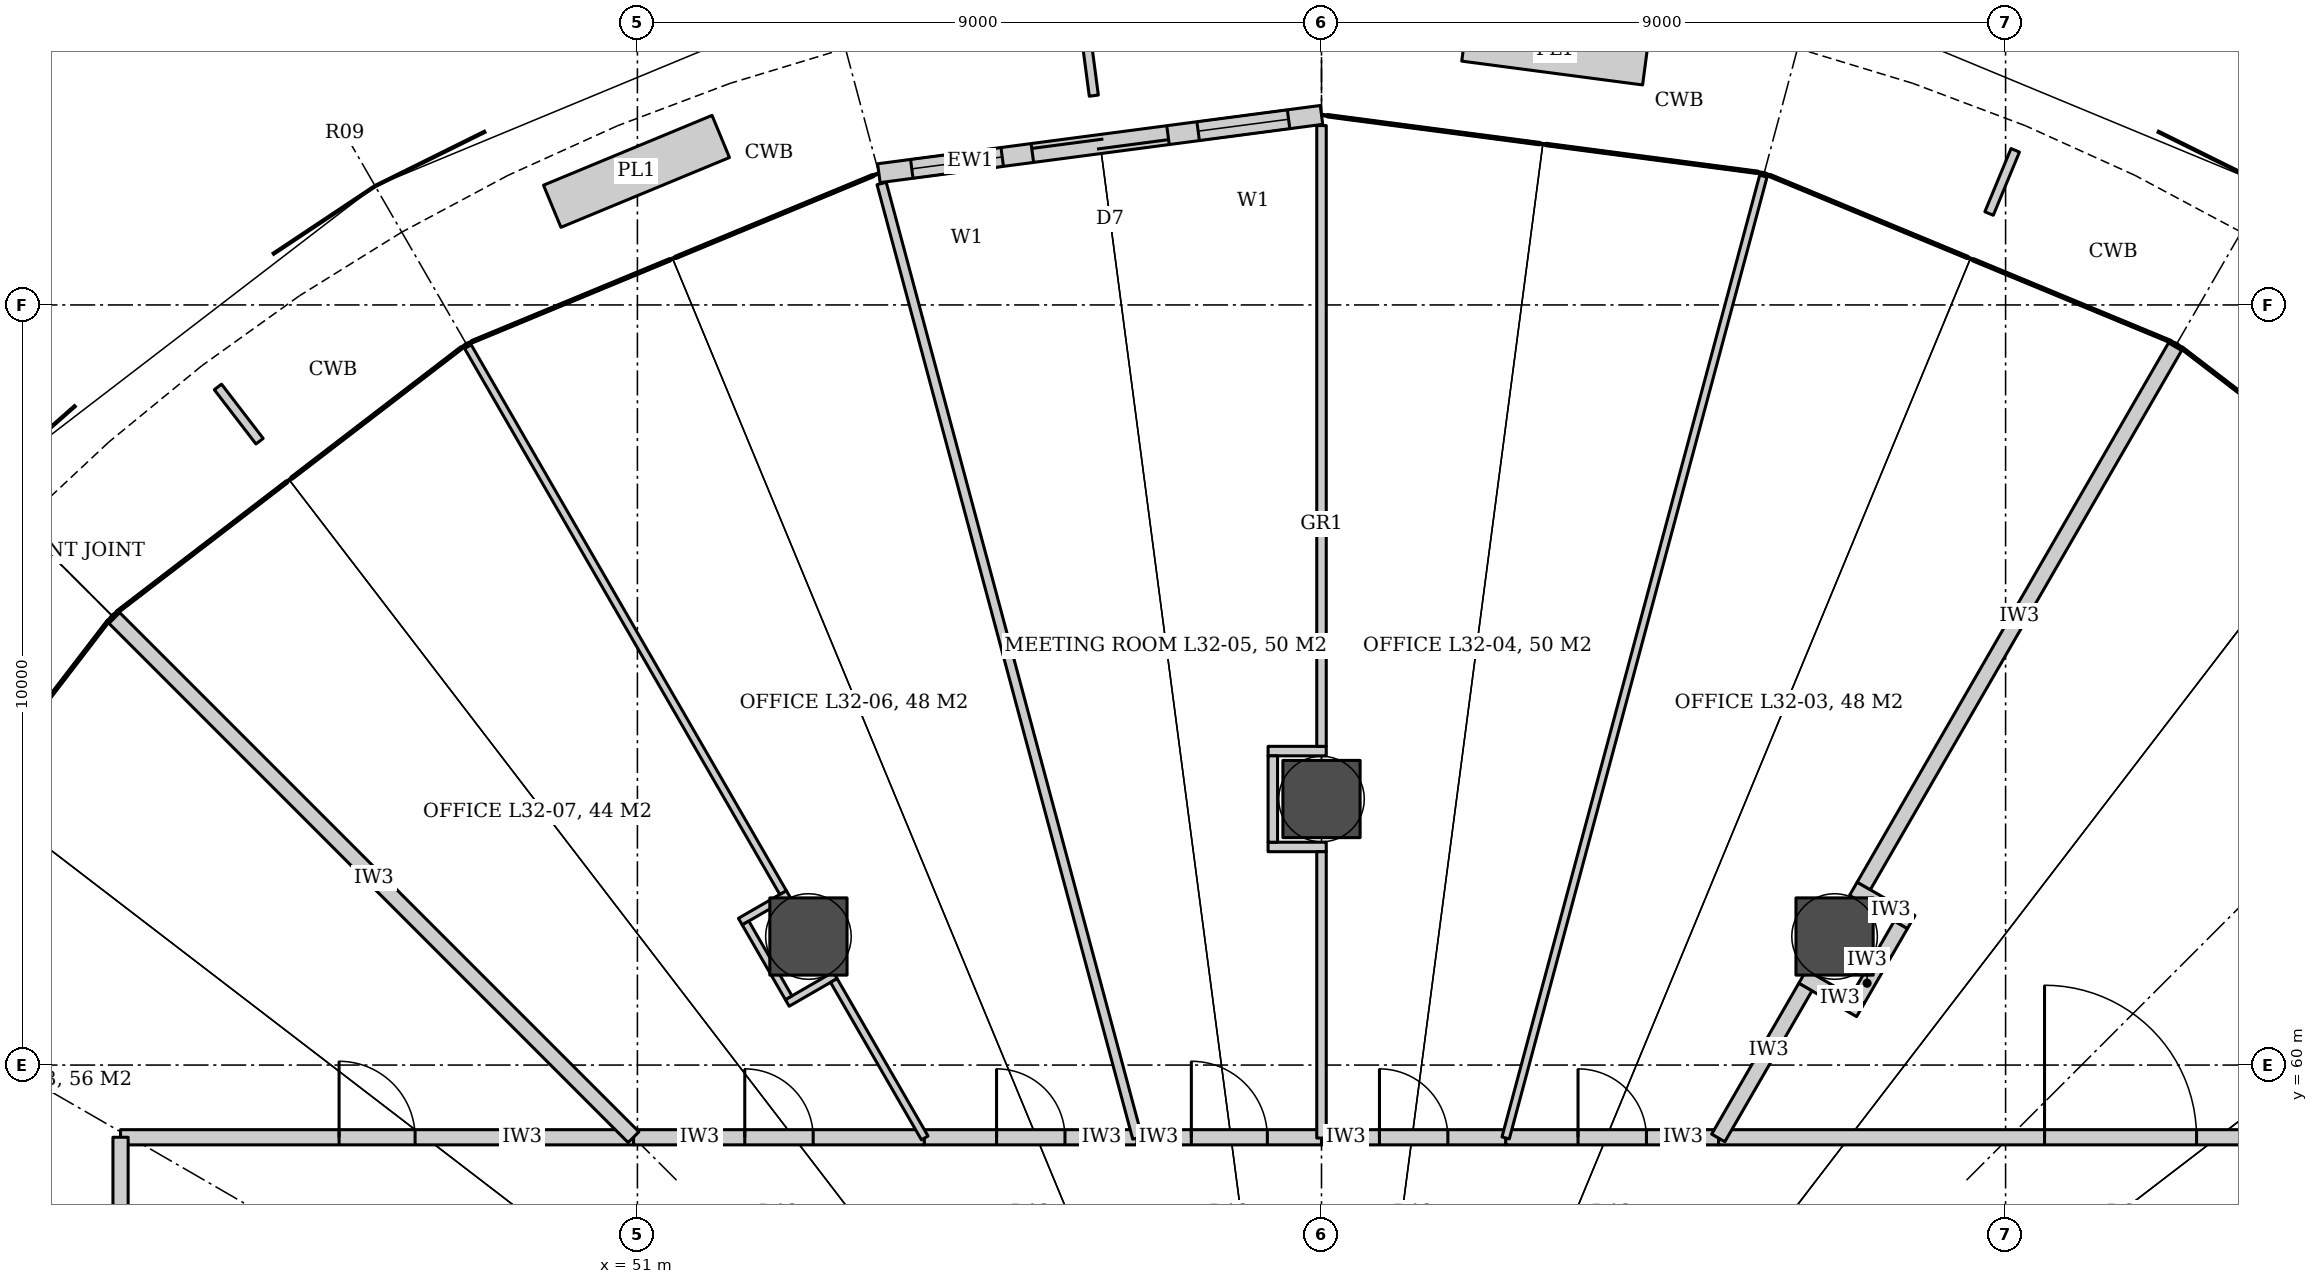
"""IFC4 building model, lengths in metres.
Left out: names, types, materials, properties, quantities, classifications, styles, units other than length and angle.
Written with IfcOpenShell. Run it as: python <this file> out.ifc"""

import sys

from ifc_helpers import new_model, si_unit, direction, frame, frame_2d, origin, origin_2d, place, context, subcontext, project, spatial, rectangle, hollow_circle, extrude, element, fill, save


model = new_model("IFC4")
c1 = context("Model", 3, precision=1e-05, world=origin(), true_north=direction((0.0, 1.0)))
c2 = subcontext(c1, "Body", "Model", "MODEL_VIEW")
j1 = project(units=[si_unit("LENGTHUNIT", "METRE"), si_unit("PLANEANGLEUNIT", "RADIAN")], contexts=[c1])
p1 = place(None, origin())
s1 = spatial("IfcSite", under=j1, at=p1, CompositionType="ELEMENT")
p2 = place(p1, origin())
s2 = spatial("IfcBuilding", under=s1, at=p2, CompositionType="ELEMENT")
p3 = place(p2, frame((0.0, 0.0, 135.2)))
s3 = spatial("IfcBuildingStorey", under=s2, at=p3, CompositionType="ELEMENT", Elevation=135.2)
for number, where, z_axis, x_axis in (
    (1, (66.75, 61.691, 0.0), (0.0, 0.0, 1.0), (1.0, 0.0, 0.0)),
    (2, (60.0, 63.5, 0.0), (0.0, 0.0, 1.0), (1.0, 0.0, 0.0)),
    (3, (53.25, 61.691, 0.0), (0.0, 0.0, 1.0), (1.0, 0.0, 0.0)),
):
    element("IfcColumn", number, at=place(p3, frame(where, z_axis=z_axis, x_axis=x_axis)), inside=s3, PredefinedType="COLUMN", context=c2, shape_type="SweptSolid", body=[
        extrude(hollow_circle(Radius=0.508, WallThickness=0.05, at=origin_2d()), origin(), (0.0, 0.0, 1.0), 4.2),
    ])
p4 = place(p3, frame((44.2, 59.05, 0.0), z_axis=(0.0, 0.0, 1.0), x_axis=(1.0, 0.0, 0.0)))
e4 = element("IfcWall", 4, at=p4, inside=s3, PredefinedType="PARTITIONING", context=c2, shape_type="SweptSolid", body=[
    extrude(rectangle(XDim=6.75, YDim=0.2, at=frame_2d((3.375, 0.0))), origin(), (0.0, 0.0, 1.0), 3.02),
])
p5 = place(p4, frame((2.875, 0.0, 0.0)))
e5 = element("IfcOpeningElement", 5, at=p5, cuts=e4, PredefinedType="OPENING", context=c2, shape_type="SweptSolid", body=[
    extrude(rectangle(XDim=1.0, YDim=2.1, at=frame_2d((0.5, 1.05))), frame((0.0, 0.11, 0.0), z_axis=(0.0, -1.0, 0.0), x_axis=(1.0, 0.0, 0.0)), (0.0, 0.0, 1.0), 0.22),
])
p6 = place(p3, frame((50.95, 59.05, 0.0), z_axis=(0.0, 0.0, 1.0), x_axis=(1.0, 0.0, 0.0)))
e6 = element("IfcWall", 6, at=p6, inside=s3, PredefinedType="PARTITIONING", context=c2, shape_type="SweptSolid", body=[
    extrude(rectangle(XDim=3.825, YDim=0.2, at=frame_2d((1.913, 0.0))), origin(), (0.0, 0.0, 1.0), 3.02),
])
p7 = place(p6, frame((1.462, 0.0, 0.0)))
e7 = element("IfcOpeningElement", 7, at=p7, cuts=e6, PredefinedType="OPENING", context=c2, shape_type="SweptSolid", body=[
    extrude(rectangle(XDim=0.9, YDim=2.4, at=frame_2d((0.45, 1.2))), frame((0.0, 0.11, 0.0), z_axis=(0.0, -1.0, 0.0), x_axis=(1.0, 0.0, 0.0)), (0.0, 0.0, 1.0), 0.22),
])
p8 = place(p3, frame((54.775, 59.05, 0.0), z_axis=(0.0, 0.0, 1.0), x_axis=(1.0, 0.0, 0.0)))
e8 = element("IfcWall", 8, at=p8, inside=s3, PredefinedType="PARTITIONING", context=c2, shape_type="SweptSolid", body=[
    extrude(rectangle(XDim=2.8, YDim=0.2, at=frame_2d((1.4, 0.0))), origin(), (0.0, 0.0, 1.0), 3.04),
])
p9 = place(p8, frame((0.95, 0.0, 0.0)))
e9 = element("IfcOpeningElement", 9, at=p9, cuts=e8, PredefinedType="OPENING", context=c2, shape_type="SweptSolid", body=[
    extrude(rectangle(XDim=0.9, YDim=2.4, at=frame_2d((0.45, 1.2))), frame((0.0, 0.11, 0.0), z_axis=(0.0, -1.0, 0.0), x_axis=(1.0, 0.0, 0.0)), (0.0, 0.0, 1.0), 0.22),
])
p10 = place(p3, frame((57.575, 59.05, 0.0), z_axis=(0.0, 0.0, 1.0), x_axis=(1.0, 0.0, 0.0)))
e10 = element("IfcWall", 10, at=p10, inside=s3, PredefinedType="PARTITIONING", context=c2, shape_type="SweptSolid", body=[
    extrude(rectangle(XDim=2.425, YDim=0.2, at=frame_2d((1.212, 0.0))), origin(), (0.0, 0.0, 1.0), 3.04),
])
p11 = place(p10, frame((0.712, 0.0, 0.0)))
e11 = element("IfcOpeningElement", 11, at=p11, cuts=e10, PredefinedType="OPENING", context=c2, shape_type="SweptSolid", body=[
    extrude(rectangle(XDim=1.0, YDim=2.4, at=frame_2d((0.5, 1.2))), frame((0.0, 0.11, 0.0), z_axis=(0.0, -1.0, 0.0), x_axis=(1.0, 0.0, 0.0)), (0.0, 0.0, 1.0), 0.22),
])
p12 = place(p3, frame((60.0, 59.05, 0.0), z_axis=(0.0, 0.0, 1.0), x_axis=(1.0, 0.0, 0.0)))
e12 = element("IfcWall", 12, at=p12, inside=s3, PredefinedType="PARTITIONING", context=c2, shape_type="SweptSolid", body=[
    extrude(rectangle(XDim=2.425, YDim=0.2, at=frame_2d((1.212, 0.0))), origin(), (0.0, 0.0, 1.0), 3.04),
])
p13 = place(p12, frame((0.762, 0.0, 0.0)))
e13 = element("IfcOpeningElement", 13, at=p13, cuts=e12, PredefinedType="OPENING", context=c2, shape_type="SweptSolid", body=[
    extrude(rectangle(XDim=0.9, YDim=2.4, at=frame_2d((0.45, 1.2))), frame((0.0, 0.11, 0.0), z_axis=(0.0, -1.0, 0.0), x_axis=(1.0, 0.0, 0.0)), (0.0, 0.0, 1.0), 0.22),
])
p14 = place(p3, frame((62.425, 59.05, 0.0), z_axis=(0.0, 0.0, 1.0), x_axis=(1.0, 0.0, 0.0)))
e14 = element("IfcWall", 14, at=p14, inside=s3, PredefinedType="PARTITIONING", context=c2, shape_type="SweptSolid", body=[
    extrude(rectangle(XDim=2.8, YDim=0.2, at=frame_2d((1.4, 0.0))), origin(), (0.0, 0.0, 1.0), 3.04),
])
p15 = place(p14, frame((0.95, 0.0, 0.0)))
e15 = element("IfcOpeningElement", 15, at=p15, cuts=e14, PredefinedType="OPENING", context=c2, shape_type="SweptSolid", body=[
    extrude(rectangle(XDim=0.9, YDim=2.4, at=frame_2d((0.45, 1.2))), frame((0.0, 0.11, 0.0), z_axis=(0.0, -1.0, 0.0), x_axis=(1.0, 0.0, 0.0)), (0.0, 0.0, 1.0), 0.22),
])
p16 = place(p3, frame((65.225, 59.05, 0.0), z_axis=(0.0, 0.0, 1.0), x_axis=(1.0, 0.0, 0.0)))
e16 = element("IfcWall", 16, at=p16, inside=s3, PredefinedType="PARTITIONING", context=c2, shape_type="SweptSolid", body=[
    extrude(rectangle(XDim=10.575, YDim=0.2, at=frame_2d((5.288, 0.0))), origin(), (0.0, 0.0, 1.0), 3.02),
])
p17 = place(p16, frame((4.288, 0.0, 0.0)))
e17 = element("IfcOpeningElement", 17, at=p17, cuts=e16, PredefinedType="OPENING", context=c2, shape_type="SweptSolid", body=[
    extrude(rectangle(XDim=2.0, YDim=2.1, at=frame_2d((1.0, 1.05))), frame((0.0, 0.11, 0.0), z_axis=(0.0, -1.0, 0.0), x_axis=(1.0, 0.0, 0.0)), (0.0, 0.0, 1.0), 0.22),
])
p18 = place(p3, frame((44.2, 54.234, 0.0), z_axis=(0.0, 0.0, 1.0), x_axis=(0.0, 1.0, 0.0)))
e18 = element("IfcWall", 18, at=p18, inside=s3, PredefinedType="PARTITIONING", context=c2, shape_type="SweptSolid", body=[
    extrude(rectangle(XDim=4.816, YDim=0.2, at=frame_2d((2.408, 0.0))), origin(), (0.0, 0.0, 1.0), 3.04),
])
for number, where, z_axis, x_axis in (
    (19, (66.329, 61.163, 0.0), (0.0, 0.0, 1.0), (0.866, -0.5, 0.0)),
    (20, (66.997, 62.32, 0.0), (0.0, 0.0, 1.0), (0.866, -0.5, 0.0)),
):
    element("IfcWall", number, at=place(p3, frame(where, z_axis=z_axis, x_axis=x_axis)), inside=s3, PredefinedType="PARTITIONING", context=c2, shape_type="SweptSolid", body=[
        extrude(rectangle(XDim=0.878, YDim=0.2, at=frame_2d((0.439, 0.0))), origin(), (0.0, 0.0, 1.0), 3.02),
    ])
p19 = place(p3, frame((67.053, 60.86, 0.0), z_axis=(0.0, 0.0, 1.0), x_axis=(0.499883687939, 0.866092546171, 0.0)))
e21 = element("IfcWall", 21, at=p19, inside=s3, PredefinedType="PARTITIONING", context=c2, shape_type="SweptSolid", body=[
    extrude(rectangle(XDim=1.136, YDim=0.2, at=frame_2d((0.568, 0.0))), origin(), (0.0, 0.0, 1.0), 3.02),
])
p20 = place(p3, frame((65.22, 59.041, 0.0), z_axis=(0.0, 0.0, 1.0), x_axis=(0.500011369369, 0.866018839577, 0.0)))
e22 = element("IfcWall", 22, at=p20, inside=s3, PredefinedType="PARTITIONING", context=c2, shape_type="SweptSolid", body=[
    extrude(rectangle(XDim=2.292, YDim=0.2, at=frame_2d((1.146, 0.0))), origin(), (0.0, 0.0, 1.0), 3.04),
])
p21 = place(p3, frame((67.134, 62.356, 0.0), z_axis=(0.0, 0.0, 1.0), x_axis=(0.499996007168, 0.866027709035, 0.0)))
e23 = element("IfcWall", 23, at=p21, inside=s3, PredefinedType="PARTITIONING", context=c2, shape_type="SweptSolid", body=[
    extrude(rectangle(XDim=8.292, YDim=0.2, at=frame_2d((4.146, 0.0))), origin(), (0.0, 0.0, 1.0), 3.04),
])
p22 = place(p3, frame((62.423, 59.041, 0.0), z_axis=(0.0, 0.0, 1.0), x_axis=(0.258825143973, 0.965924192081, 0.0)))
e24 = element("IfcWall", 24, at=p22, inside=s3, PredefinedType="PARTITIONING", context=c2, shape_type="SweptSolid", body=[
    extrude(rectangle(XDim=13.2, YDim=0.1, at=frame_2d((6.6, 0.0))), origin(), (0.0, 0.0, 1.0), 3.02),
])
for number, where, z_axis, x_axis in (
    (25, (60.062, 62.869, 0.0), (0.0, 0.0, 1.0), (-1.0, 0.0, 0.0)),
    (26, (60.062, 64.131, 0.0), (0.0, 0.0, 1.0), (-1.0, 0.0, 0.0)),
):
    element("IfcWall", number, at=place(p3, frame(where, z_axis=z_axis, x_axis=x_axis)), inside=s3, PredefinedType="PARTITIONING", context=c2, shape_type="SweptSolid", body=[
        extrude(rectangle(XDim=0.765, YDim=0.125, at=frame_2d((0.383, 0.0))), origin(), (0.0, 0.0, 1.0), 3.02),
    ])
p23 = place(p3, frame((59.36, 62.932, 0.0), z_axis=(0.0, 0.0, 1.0), x_axis=(0.0, 1.0, 0.0)))
e27 = element("IfcWall", 27, at=p23, inside=s3, PredefinedType="PARTITIONING", context=c2, shape_type="SweptSolid", body=[
    extrude(rectangle(XDim=1.136, YDim=0.125, at=frame_2d((0.568, 0.0))), origin(), (0.0, 0.0, 1.0), 3.02),
])
p24 = place(p3, frame((60.0, 59.04, 0.0), z_axis=(0.0, 0.0, 1.0), x_axis=(0.0, 1.0, 0.0)))
e28 = element("IfcWall", 28, at=p24, inside=s3, PredefinedType="PARTITIONING", context=c2, shape_type="SweptSolid", body=[
    extrude(rectangle(XDim=3.767, YDim=0.125, at=frame_2d((1.883, 0.0))), origin(), (0.0, 0.0, 1.0), 3.04),
])
p25 = place(p3, frame((60.0, 64.193, 0.0), z_axis=(0.0, 0.0, 1.0), x_axis=(0.0, 1.0, 0.0)))
e29 = element("IfcWall", 29, at=p25, inside=s3, PredefinedType="PARTITIONING", context=c2, shape_type="SweptSolid", body=[
    extrude(rectangle(XDim=8.267, YDim=0.125, at=frame_2d((4.133, 0.0))), origin(), (0.0, 0.0, 1.0), 3.04),
])
p26 = place(p3, frame((57.577, 59.041, 0.0), z_axis=(0.0, 0.0, 1.0), x_axis=(-0.258809678054, 0.965928336133, 0.0)))
e30 = element("IfcWall", 30, at=p26, inside=s3, PredefinedType="PARTITIONING", context=c2, shape_type="SweptSolid", body=[
    extrude(rectangle(XDim=13.1, YDim=0.125, at=frame_2d((6.55, 0.0))), origin(), (0.0, 0.0, 1.0), 3.02),
])
for number, where, z_axis, x_axis in (
    (31, (53.602, 61.181, 0.0), (0.0, 0.0, 1.0), (-0.866, -0.5, 0.0)),
    (32, (52.984, 62.251, 0.0), (0.0, 0.0, 1.0), (-0.866, -0.5, 0.0)),
):
    element("IfcWall", number, at=place(p3, frame(where, z_axis=z_axis, x_axis=x_axis)), inside=s3, PredefinedType="PARTITIONING", context=c2, shape_type="SweptSolid", body=[
        extrude(rectangle(XDim=0.728, YDim=0.1, at=frame_2d((0.364, 0.0))), origin(), (0.0, 0.0, 1.0), 3.02),
    ])
p27 = place(p3, frame((52.99, 60.885, 0.0), z_axis=(0.0, 0.0, 1.0), x_axis=(-0.499976747263, 0.866038828342, 0.0)))
e33 = element("IfcWall", 33, at=p27, inside=s3, PredefinedType="PARTITIONING", context=c2, shape_type="SweptSolid", body=[
    extrude(rectangle(XDim=1.136, YDim=0.1, at=frame_2d((0.568, 0.0))), origin(), (0.0, 0.0, 1.0), 3.02),
])
p28 = place(p3, frame((54.78, 59.041, 0.0), z_axis=(0.0, 0.0, 1.0), x_axis=(-0.500014005679, 0.866017317451, 0.0)))
e34 = element("IfcWall", 34, at=p28, inside=s3, PredefinedType="PARTITIONING", context=c2, shape_type="SweptSolid", body=[
    extrude(rectangle(XDim=2.392, YDim=0.1, at=frame_2d((1.196, 0.0))), origin(), (0.0, 0.0, 1.0), 3.04),
])
p29 = place(p3, frame((52.916, 62.27, 0.0), z_axis=(0.0, 0.0, 1.0), x_axis=(-0.499996941814, 0.866027169422, 0.0)))
e35 = element("IfcWall", 35, at=p29, inside=s3, PredefinedType="PARTITIONING", context=c2, shape_type="SweptSolid", body=[
    extrude(rectangle(XDim=8.392, YDim=0.1, at=frame_2d((4.196, 0.0))), origin(), (0.0, 0.0, 1.0), 3.04),
])
p30 = place(p3, frame((50.949, 59.051, 0.0), z_axis=(0.0, 0.0, 1.0), x_axis=(-0.707106781187, 0.707106781187, 0.0)))
e36 = element("IfcWall", 36, at=p30, inside=s3, PredefinedType="PARTITIONING", context=c2, shape_type="SweptSolid", body=[
    extrude(rectangle(XDim=9.76, YDim=0.2, at=frame_2d((4.88, 0.0))), origin(), (0.0, 0.0, 1.0), 3.02),
])
p31 = place(p3, frame((60.0, 72.6, 0.0), z_axis=(0.0, 0.0, 1.0), x_axis=(-0.991440909901, -0.130556203128, 0.0)))
e37 = element("IfcWall", 37, at=p31, inside=s3, PredefinedType="SOLIDWALL", context=c2, shape_type="SweptSolid", body=[
    extrude(rectangle(XDim=5.9, YDim=0.25, at=frame_2d((2.95, 0.0))), origin(), (0.0, 0.0, 1.0), 4.04),
])
p32 = place(p31, frame((2.05, 0.0, 0.0)))
e38 = element("IfcOpeningElement", 38, at=p32, cuts=e37, PredefinedType="OPENING", context=c2, shape_type="SweptSolid", body=[
    extrude(rectangle(XDim=1.8, YDim=2.4, at=frame_2d((0.9, 1.2))), frame((0.0, 0.135, 0.0), z_axis=(0.0, -1.0, 0.0), x_axis=(1.0, 0.0, 0.0)), (0.0, 0.0, 1.0), 0.27),
])
p33 = place(p31, frame((0.45, 0.0, 0.0)))
e39 = element("IfcOpeningElement", 39, at=p33, cuts=e37, PredefinedType="OPENING", context=c2, shape_type="SweptSolid", body=[
    extrude(rectangle(XDim=1.2, YDim=2.4, at=frame_2d((0.6, 1.2))), frame((0.0, 0.135, 0.0), z_axis=(0.0, -1.0, 0.0), x_axis=(1.0, 0.0, 0.0)), (0.0, 0.0, 1.0), 0.27),
])
p34 = place(p31, frame((4.25, 0.0, 0.0)))
e40 = element("IfcOpeningElement", 40, at=p34, cuts=e37, PredefinedType="OPENING", context=c2, shape_type="SweptSolid", body=[
    extrude(rectangle(XDim=1.2, YDim=2.4, at=frame_2d((0.6, 1.2))), frame((0.0, 0.135, 0.0), z_axis=(0.0, -1.0, 0.0), x_axis=(1.0, 0.0, 0.0)), (0.0, 0.0, 1.0), 0.27),
])
p35 = place(p17, origin())
e41 = element("IfcDoor", 41, at=p35, inside=s3, OperationType="DOUBLE_DOOR_DOUBLE_SWING", PredefinedType="DOOR", context=c2, shape_type="SweptSolid", body=[
    extrude(rectangle(XDim=2.0, YDim=2.1, at=frame_2d((1.0, 1.05))), frame((0.0, 0.025, 0.0), z_axis=(0.0, -1.0, 0.0), x_axis=(1.0, 0.0, 0.0)), (0.0, 0.0, 1.0), 0.05),
])
fill(e17, e41)
p36 = place(p15, origin())
e42 = element("IfcDoor", 42, at=p36, inside=s3, OperationType="SINGLE_SWING_LEFT", PredefinedType="DOOR", context=c2, shape_type="SweptSolid", body=[
    extrude(rectangle(XDim=0.9, YDim=2.4, at=frame_2d((0.45, 1.2))), frame((0.0, 0.025, 0.0), z_axis=(0.0, -1.0, 0.0), x_axis=(1.0, 0.0, 0.0)), (0.0, 0.0, 1.0), 0.05),
])
fill(e15, e42)
p37 = place(p13, origin())
e43 = element("IfcDoor", 43, at=p37, inside=s3, OperationType="SINGLE_SWING_LEFT", PredefinedType="DOOR", context=c2, shape_type="SweptSolid", body=[
    extrude(rectangle(XDim=0.9, YDim=2.4, at=frame_2d((0.45, 1.2))), frame((0.0, 0.025, 0.0), z_axis=(0.0, -1.0, 0.0), x_axis=(1.0, 0.0, 0.0)), (0.0, 0.0, 1.0), 0.05),
])
fill(e13, e43)
p38 = place(p11, origin())
e44 = element("IfcDoor", 44, at=p38, inside=s3, OperationType="SINGLE_SWING_LEFT", PredefinedType="DOOR", context=c2, shape_type="SweptSolid", body=[
    extrude(rectangle(XDim=1.0, YDim=2.4, at=frame_2d((0.5, 1.2))), frame((0.0, 0.025, 0.0), z_axis=(0.0, -1.0, 0.0), x_axis=(1.0, 0.0, 0.0)), (0.0, 0.0, 1.0), 0.05),
])
fill(e11, e44)
p39 = place(p9, origin())
e45 = element("IfcDoor", 45, at=p39, inside=s3, OperationType="SINGLE_SWING_LEFT", PredefinedType="DOOR", context=c2, shape_type="SweptSolid", body=[
    extrude(rectangle(XDim=0.9, YDim=2.4, at=frame_2d((0.45, 1.2))), frame((0.0, 0.025, 0.0), z_axis=(0.0, -1.0, 0.0), x_axis=(1.0, 0.0, 0.0)), (0.0, 0.0, 1.0), 0.05),
])
fill(e9, e45)
p40 = place(p7, origin())
e46 = element("IfcDoor", 46, at=p40, inside=s3, OperationType="SINGLE_SWING_LEFT", PredefinedType="DOOR", context=c2, shape_type="SweptSolid", body=[
    extrude(rectangle(XDim=0.9, YDim=2.4, at=frame_2d((0.45, 1.2))), frame((0.0, 0.025, 0.0), z_axis=(0.0, -1.0, 0.0), x_axis=(1.0, 0.0, 0.0)), (0.0, 0.0, 1.0), 0.05),
])
fill(e7, e46)
p41 = place(p5, origin())
e47 = element("IfcDoor", 47, at=p41, inside=s3, OperationType="SINGLE_SWING_LEFT", PredefinedType="DOOR", context=c2, shape_type="SweptSolid", body=[
    extrude(rectangle(XDim=1.0, YDim=2.1, at=frame_2d((0.5, 1.05))), frame((0.0, 0.025, 0.0), z_axis=(0.0, -1.0, 0.0), x_axis=(1.0, 0.0, 0.0)), (0.0, 0.0, 1.0), 0.05),
])
fill(e5, e47)
p42 = place(p32, origin())
e48 = element("IfcDoor", 48, at=p42, inside=s3, OperationType="DOUBLE_DOOR_SLIDING", PredefinedType="DOOR", context=c2, shape_type="SweptSolid", body=[
    extrude(rectangle(XDim=1.8, YDim=2.4, at=frame_2d((0.9, 1.2))), frame((0.0, 0.025, 0.0), z_axis=(0.0, -1.0, 0.0), x_axis=(1.0, 0.0, 0.0)), (0.0, 0.0, 1.0), 0.05),
])
fill(e38, e48)
p43 = place(p33, origin())
e49 = element("IfcWindow", 49, at=p43, inside=s3, PartitioningType="SINGLE_PANEL", PredefinedType="WINDOW", context=c2, shape_type="SweptSolid", body=[
    extrude(rectangle(XDim=1.2, YDim=2.4, at=frame_2d((0.6, 1.2))), frame((0.0, 0.03, 0.0), z_axis=(0.0, -1.0, 0.0), x_axis=(1.0, 0.0, 0.0)), (0.0, 0.0, 1.0), 0.06),
])
fill(e39, e49)
p44 = place(p34, origin())
e50 = element("IfcWindow", 50, at=p44, inside=s3, PartitioningType="SINGLE_PANEL", PredefinedType="WINDOW", context=c2, shape_type="SweptSolid", body=[
    extrude(rectangle(XDim=1.2, YDim=2.4, at=frame_2d((0.6, 1.2))), frame((0.0, 0.03, 0.0), z_axis=(0.0, -1.0, 0.0), x_axis=(1.0, 0.0, 0.0)), (0.0, 0.0, 1.0), 0.06),
])
fill(e40, e50)
save(model, sys.argv[1])
